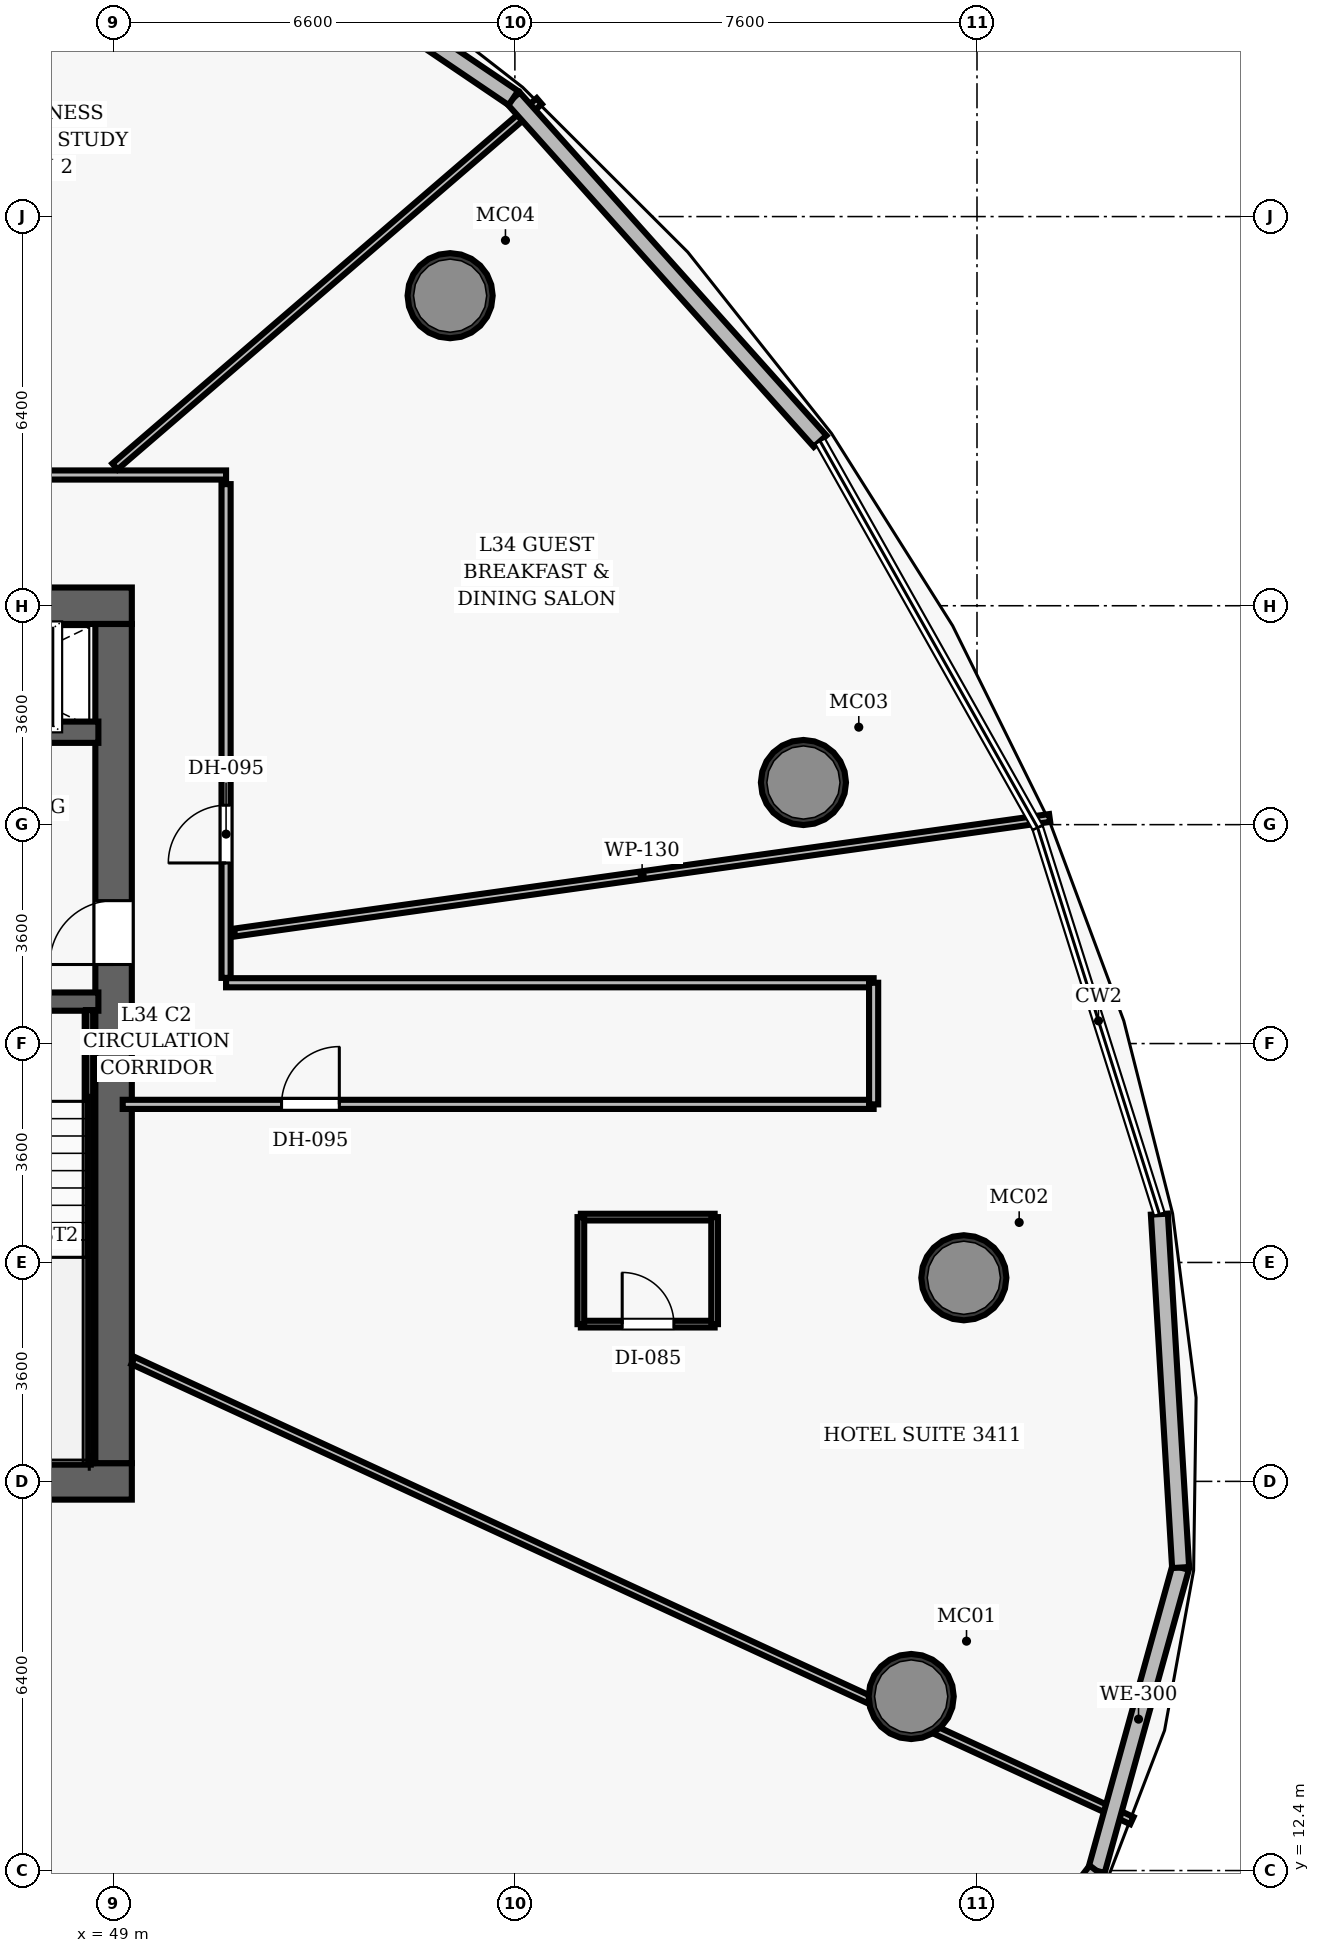
"""IFC4 building model, lengths in metres.
Left out: names, types, materials, properties, quantities, classifications, styles, units other than length and angle.
Written with IfcOpenShell. Run it as: python <this file> out.ifc"""

import sys

from ifc_helpers import new_model, si_unit, direction, frame, frame_2d, origin, origin_2d, place, context, subcontext, project, spatial, rectangle, hollow_circle, extrude, element, fill, save


model = new_model("IFC4")
c1 = context("Model", 3, precision=1e-05, world=origin(), true_north=direction((0.0, 1.0)))
c2 = subcontext(c1, "Body", "Model", "MODEL_VIEW")
j1 = project(units=[si_unit("LENGTHUNIT", "METRE"), si_unit("PLANEANGLEUNIT", "RADIAN")], contexts=[c1])
p1 = place(None, origin())
s1 = spatial("IfcSite", under=j1, at=p1, CompositionType="ELEMENT")
p2 = place(p1, origin())
s2 = spatial("IfcBuilding", under=s1, at=p2, CompositionType="ELEMENT")
p3 = place(p2, frame((0.0, 0.0, 137.8)))
s3 = spatial("IfcBuildingStorey", under=s2, at=p3, CompositionType="ELEMENT", Elevation=137.8)
p4 = place(p3, frame((26.7, 18.8, 0.0), z_axis=(0.0, 0.0, 1.0), x_axis=(1.0, 0.0, 0.0)))
e1 = element("IfcWall", 1, at=p4, inside=s3, PredefinedType="SHEAR", context=c2, shape_type="SweptSolid", body=[
    extrude(rectangle(XDim=22.6, YDim=0.6, at=frame_2d((11.3, 0.0))), origin(), (0.0, 0.0, 1.0), 3.5),
])
p5 = place(p4, frame((14.52, 0.0, 0.0)))
e2 = element("IfcOpeningElement", 2, at=p5, cuts=e1, PredefinedType="OPENING", context=c2, shape_type="SweptSolid", body=[
    extrude(rectangle(XDim=1.05, YDim=2.15, at=frame_2d((0.525, 1.075))), frame((0.0, 0.31, 0.0), z_axis=(0.0, -1.0, 0.0), x_axis=(1.0, 0.0, 0.0)), (0.0, 0.0, 1.0), 0.62),
])
p6 = place(p3, frame((26.7, 33.2, 0.0), z_axis=(0.0, 0.0, 1.0), x_axis=(1.0, 0.0, 0.0)))
e3 = element("IfcWall", 3, at=p6, inside=s3, PredefinedType="SHEAR", context=c2, shape_type="SweptSolid", body=[
    extrude(rectangle(XDim=22.6, YDim=0.6, at=frame_2d((11.3, 0.0))), origin(), (0.0, 0.0, 1.0), 3.5),
])
p7 = place(p6, frame((4.62, 0.0, 0.0)))
e4 = element("IfcOpeningElement", 4, at=p7, cuts=e3, PredefinedType="OPENING", context=c2, shape_type="SweptSolid", body=[
    extrude(rectangle(XDim=1.05, YDim=2.15, at=frame_2d((0.525, 1.075))), frame((0.0, 0.31, 0.0), z_axis=(0.0, -1.0, 0.0), x_axis=(1.0, 0.0, 0.0)), (0.0, 0.0, 1.0), 0.62),
])
p8 = place(p6, frame((14.52, 0.0, 0.0)))
e5 = element("IfcOpeningElement", 5, at=p8, cuts=e3, PredefinedType="OPENING", context=c2, shape_type="SweptSolid", body=[
    extrude(rectangle(XDim=1.05, YDim=2.15, at=frame_2d((0.525, 1.075))), frame((0.0, 0.31, 0.0), z_axis=(0.0, -1.0, 0.0), x_axis=(1.0, 0.0, 0.0)), (0.0, 0.0, 1.0), 0.62),
])
p9 = place(p3, frame((49.0, 19.1, 0.0), z_axis=(0.0, 0.0, 1.0), x_axis=(0.0, 1.0, 0.0)))
e6 = element("IfcWall", 6, at=p9, inside=s3, PredefinedType="SHEAR", context=c2, shape_type="SweptSolid", body=[
    extrude(rectangle(XDim=13.8, YDim=0.6, at=frame_2d((6.9, 0.0))), origin(), (0.0, 0.0, 1.0), 3.5),
])
p10 = place(p9, frame((8.2, 0.0, 0.0)))
e7 = element("IfcOpeningElement", 7, at=p10, cuts=e6, PredefinedType="OPENING", context=c2, shape_type="SweptSolid", body=[
    extrude(rectangle(XDim=1.05, YDim=2.15, at=frame_2d((0.525, 1.075))), frame((0.0, 0.31, 0.0), z_axis=(0.0, -1.0, 0.0), x_axis=(1.0, 0.0, 0.0)), (0.0, 0.0, 1.0), 0.62),
])
for number, where, z_axis, x_axis in (
    (8, (62.118, 15.262, 0.0), (0.0, 0.0, 1.0), (1.0, 0.0, 0.0)),
    (9, (62.984, 22.148, 0.0), (0.0, 0.0, 1.0), (1.0, 0.0, 0.0)),
    (10, (60.346, 30.293, 0.0), (0.0, 0.0, 1.0), (1.0, 0.0, 0.0)),
    (11, (54.535, 38.299, 0.0), (0.0, 0.0, 1.0), (1.0, 0.0, 0.0)),
):
    element("IfcColumn", number, at=place(p3, frame(where, z_axis=z_axis, x_axis=x_axis)), inside=s3, PredefinedType="COLUMN", context=c2, shape_type="SweptSolid", body=[
        extrude(hollow_circle(Radius=0.7, WallThickness=0.055, at=origin_2d()), origin(), (0.0, 0.0, 1.0), 3.5),
    ])
p11 = place(p3, frame((45.08, 26.69, 0.0), z_axis=(0.0, 0.0, 1.0), x_axis=(1.0, 0.0, 0.0)))
e12 = element("IfcWall", 12, at=p11, inside=s3, PredefinedType="SHEAR", context=c2, shape_type="SweptSolid", body=[
    extrude(rectangle(XDim=3.67, YDim=0.3, at=frame_2d((1.835, 0.0))), origin(), (0.0, 0.0, 1.0), 3.5),
])
p12 = place(p11, frame((1.05, 0.0, 0.0)))
e13 = element("IfcOpeningElement", 13, at=p12, cuts=e12, PredefinedType="OPENING", context=c2, shape_type="SweptSolid", body=[
    extrude(rectangle(XDim=1.1, YDim=2.15, at=frame_2d((0.55, 1.075))), frame((0.0, 0.16, 0.0), z_axis=(0.0, -1.0, 0.0), x_axis=(1.0, 0.0, 0.0)), (0.0, 0.0, 1.0), 0.32),
])
p13 = place(p3, frame((48.605, 19.1, 0.0), z_axis=(0.0, 0.0, 1.0), x_axis=(0.0, 1.0, 0.0)))
e14 = element("IfcWall", 14, at=p13, inside=s3, PredefinedType="SHEAR", context=c2, shape_type="SweptSolid", body=[
    extrude(rectangle(XDim=7.45, YDim=0.12, at=frame_2d((3.725, 0.0))), origin(), (0.0, 0.0, 1.0), 3.5),
])
p14 = place(p3, frame((45.51, 19.16, 0.0), z_axis=(0.0, 0.0, 1.0), x_axis=(1.0, 0.0, 0.0)))
e15 = element("IfcWall", 15, at=p14, inside=s3, PredefinedType="SHEAR", context=c2, shape_type="SweptSolid", body=[
    extrude(rectangle(XDim=3.095, YDim=0.12, at=frame_2d((1.547, 0.0))), origin(), (0.0, 0.0, 1.0), 3.5),
])
p15 = place(p3, frame((45.08, 31.12, 0.0), z_axis=(0.0, 0.0, 1.0), x_axis=(1.0, 0.0, 0.0)))
e16 = element("IfcWall", 16, at=p15, inside=s3, PredefinedType="SHEAR", context=c2, shape_type="SweptSolid", body=[
    extrude(rectangle(XDim=3.67, YDim=0.35, at=frame_2d((1.835, 0.0))), origin(), (0.0, 0.0, 1.0), 2.675),
])
p16 = place(p15, frame((1.25, 0.0, 0.0)))
e17 = element("IfcOpeningElement", 17, at=p16, cuts=e16, PredefinedType="OPENING", context=c2, shape_type="SweptSolid", body=[
    extrude(rectangle(XDim=1.1, YDim=2.15, at=frame_2d((0.55, 1.075))), frame((0.0, 0.185, 0.0), z_axis=(0.0, -1.0, 0.0), x_axis=(1.0, 0.0, 0.0)), (0.0, 0.0, 1.0), 0.37),
])
p17 = place(p3, frame((24.85, 35.35, 0.0), z_axis=(0.0, 0.0, 1.0), x_axis=(1.0, 0.0, 0.0)))
e18 = element("IfcWall", 18, at=p17, inside=s3, PredefinedType="PARTITIONING", context=c2, shape_type="SweptSolid", body=[
    extrude(rectangle(XDim=26.0, YDim=0.15, at=frame_2d((13.0, 0.0))), origin(), (0.0, 0.0, 1.0), 2.675),
])
p18 = place(p17, frame((17.4, 0.0, 0.0)))
e19 = element("IfcOpeningElement", 19, at=p18, cuts=e18, PredefinedType="OPENING", context=c2, shape_type="SweptSolid", body=[
    extrude(rectangle(XDim=0.95, YDim=2.15, at=frame_2d((0.475, 1.075))), frame((0.0, 0.085, 0.0), z_axis=(0.0, -1.0, 0.0), x_axis=(1.0, 0.0, 0.0)), (0.0, 0.0, 1.0), 0.17),
])
p19 = place(p17, frame((12.708, 0.0, 0.0)))
e20 = element("IfcOpeningElement", 20, at=p19, cuts=e18, PredefinedType="OPENING", context=c2, shape_type="SweptSolid", body=[
    extrude(rectangle(XDim=0.95, YDim=2.15, at=frame_2d((0.475, 1.075))), frame((0.0, 0.085, 0.0), z_axis=(0.0, -1.0, 0.0), x_axis=(1.0, 0.0, 0.0)), (0.0, 0.0, 1.0), 0.17),
])
p20 = place(p17, frame((7.158, 0.0, 0.0)))
e21 = element("IfcOpeningElement", 21, at=p20, cuts=e18, PredefinedType="OPENING", context=c2, shape_type="SweptSolid", body=[
    extrude(rectangle(XDim=0.95, YDim=2.15, at=frame_2d((0.475, 1.075))), frame((0.0, 0.085, 0.0), z_axis=(0.0, -1.0, 0.0), x_axis=(1.0, 0.0, 0.0)), (0.0, 0.0, 1.0), 0.17),
])
p21 = place(p3, frame((50.85, 27.08, 0.0), z_axis=(0.0, 0.0, 1.0), x_axis=(0.0, 1.0, 0.0)))
e22 = element("IfcWall", 22, at=p21, inside=s3, PredefinedType="PARTITIONING", context=c2, shape_type="SweptSolid", body=[
    extrude(rectangle(XDim=8.12, YDim=0.15, at=frame_2d((4.06, 0.0))), origin(), (0.0, 0.0, 1.0), 2.675),
])
p22 = place(p21, frame((1.89, 0.0, 0.0)))
e23 = element("IfcOpeningElement", 23, at=p22, cuts=e22, PredefinedType="OPENING", context=c2, shape_type="SweptSolid", body=[
    extrude(rectangle(XDim=0.95, YDim=2.15, at=frame_2d((0.475, 1.075))), frame((0.0, 0.085, 0.0), z_axis=(0.0, -1.0, 0.0), x_axis=(1.0, 0.0, 0.0)), (0.0, 0.0, 1.0), 0.17),
])
p23 = place(p3, frame((50.85, 27.0, 0.0), z_axis=(0.0, 0.0, 1.0), x_axis=(1.0, 0.0, 0.0)))
e24 = element("IfcWall", 24, at=p23, inside=s3, PredefinedType="PARTITIONING", context=c2, shape_type="SweptSolid", body=[
    extrude(rectangle(XDim=10.65, YDim=0.15, at=frame_2d((5.325, 0.0))), origin(), (0.0, 0.0, 1.0), 2.675),
])
p24 = place(p3, frame((49.15, 25.0, 0.0), z_axis=(0.0, 0.0, 1.0), x_axis=(1.0, 0.0, 0.0)))
e25 = element("IfcWall", 25, at=p24, inside=s3, PredefinedType="PARTITIONING", context=c2, shape_type="SweptSolid", body=[
    extrude(rectangle(XDim=12.35, YDim=0.15, at=frame_2d((6.175, 0.0))), origin(), (0.0, 0.0, 1.0), 2.675),
])
p25 = place(p24, frame((2.613, 0.0, 0.0)))
e26 = element("IfcOpeningElement", 26, at=p25, cuts=e25, PredefinedType="OPENING", context=c2, shape_type="SweptSolid", body=[
    extrude(rectangle(XDim=0.95, YDim=2.15, at=frame_2d((0.475, 1.075))), frame((0.0, 0.085, 0.0), z_axis=(0.0, -1.0, 0.0), x_axis=(1.0, 0.0, 0.0)), (0.0, 0.0, 1.0), 0.17),
])
p26 = place(p3, frame((61.5, 25.0, 0.0), z_axis=(0.0, 0.0, 1.0), x_axis=(0.0, 1.0, 0.0)))
e27 = element("IfcWall", 27, at=p26, inside=s3, PredefinedType="PARTITIONING", context=c2, shape_type="SweptSolid", body=[
    extrude(rectangle(XDim=2.0, YDim=0.15, at=frame_2d((1.0, 0.0))), origin(), (0.0, 0.0, 1.0), 2.675),
])
p27 = place(p3, frame((50.99, 27.826, 0.0), z_axis=(0.0, 0.0, 1.0), x_axis=(0.990267262421, 0.13917883811, 0.0)))
e28 = element("IfcWall", 28, at=p27, inside=s3, PredefinedType="PARTITIONING", context=c2, shape_type="SweptSolid", body=[
    extrude(rectangle(XDim=13.537, YDim=0.13, at=frame_2d((6.769, 0.0))), origin(), (0.0, 0.0, 1.0), 2.675),
])
p28 = place(p3, frame((49.022, 35.49, 0.0), z_axis=(0.0, 0.0, 1.0), x_axis=(0.757832522769, 0.65244913015, 0.0)))
e29 = element("IfcWall", 29, at=p28, inside=s3, PredefinedType="PARTITIONING", context=c2, shape_type="SweptSolid", body=[
    extrude(rectangle(XDim=9.209, YDim=0.13, at=frame_2d((4.604, 0.0))), origin(), (0.0, 0.0, 1.0), 2.675),
])
p29 = place(p3, frame((42.799, 18.48, 0.0), z_axis=(0.0, 0.0, 1.0), x_axis=(0.537969305378, -0.842964427762, 0.0)))
e30 = element("IfcWall", 30, at=p29, inside=s3, PredefinedType="PARTITIONING", context=c2, shape_type="SweptSolid", body=[
    extrude(rectangle(XDim=18.19, YDim=0.13, at=frame_2d((9.095, 0.0))), origin(), (0.0, 0.0, 1.0), 2.675),
])
p30 = place(p3, frame((49.32, 20.787, 0.0), z_axis=(0.0, 0.0, 1.0), x_axis=(0.90831109322, -0.418295299918, 0.0)))
e31 = element("IfcWall", 31, at=p30, inside=s3, PredefinedType="PARTITIONING", context=c2, shape_type="SweptSolid", body=[
    extrude(rectangle(XDim=18.086, YDim=0.13, at=frame_2d((9.043, 0.0))), origin(), (0.0, 0.0, 1.0), 2.675),
])
p31 = place(p3, frame((56.685, 21.386, 0.0), z_axis=(0.0, 0.0, 1.0), x_axis=(1.0, 0.0, 0.0)))
e32 = element("IfcWall", 32, at=p31, inside=s3, PredefinedType="PARTITIONING", context=c2, shape_type="SweptSolid", body=[
    extrude(rectangle(XDim=2.2, YDim=0.11, at=frame_2d((1.1, 0.0))), origin(), (0.0, 0.0, 1.0), 2.675),
])
p32 = place(p31, frame((0.68, 0.0, 0.0)))
e33 = element("IfcOpeningElement", 33, at=p32, cuts=e32, PredefinedType="OPENING", context=c2, shape_type="SweptSolid", body=[
    extrude(rectangle(XDim=0.85, YDim=2.1, at=frame_2d((0.425, 1.05))), frame((0.0, 0.065, 0.0), z_axis=(0.0, -1.0, 0.0), x_axis=(1.0, 0.0, 0.0)), (0.0, 0.0, 1.0), 0.13),
])
p33 = place(p3, frame((56.685, 23.146, 0.0), z_axis=(0.0, 0.0, 1.0), x_axis=(1.0, 0.0, 0.0)))
e34 = element("IfcWall", 34, at=p33, inside=s3, PredefinedType="PARTITIONING", context=c2, shape_type="SweptSolid", body=[
    extrude(rectangle(XDim=2.2, YDim=0.11, at=frame_2d((1.1, 0.0))), origin(), (0.0, 0.0, 1.0), 2.675),
])
for number, where, z_axis, x_axis in (
    (35, (56.685, 21.386, 0.0), (0.0, 0.0, 1.0), (0.0, 1.0, 0.0)),
    (36, (58.885, 21.386, 0.0), (0.0, 0.0, 1.0), (0.0, 1.0, 0.0)),
):
    element("IfcWall", number, at=place(p3, frame(where, z_axis=z_axis, x_axis=x_axis)), inside=s3, PredefinedType="PARTITIONING", context=c2, shape_type="SweptSolid", body=[
        extrude(rectangle(XDim=1.76, YDim=0.11, at=frame_2d((0.88, 0.0))), origin(), (0.0, 0.0, 1.0), 2.675),
    ])
p34 = place(p3, frame((66.549, 17.383, 0.0), z_axis=(0.0, 0.0, 1.0), x_axis=(-0.267621962154, -0.963523993149, 0.0)))
e37 = element("IfcWall", 37, at=p34, inside=s3, PredefinedType="SOLIDWALL", context=c2, shape_type="SweptSolid", body=[
    extrude(rectangle(XDim=5.174, YDim=0.28, at=frame_2d((2.587, 0.0))), origin(), (0.0, 0.0, 1.0), 3.26),
])
p35 = place(p3, frame((66.199, 23.195, 0.0), z_axis=(0.0, 0.0, 1.0), x_axis=(0.060044369296, -0.998195709125, 0.0)))
e38 = element("IfcWall", 38, at=p35, inside=s3, PredefinedType="SOLIDWALL", context=c2, shape_type="SweptSolid", body=[
    extrude(rectangle(XDim=5.823, YDim=0.28, at=frame_2d((2.911, 0.0))), origin(), (0.0, 0.0, 1.0), 3.26),
])
p36 = place(p3, frame((55.575, 41.549, 0.0), z_axis=(0.0, 0.0, 1.0), x_axis=(0.666525173895, -0.745482523312, 0.0)))
e39 = element("IfcWall", 39, at=p36, inside=s3, PredefinedType="SOLIDWALL", context=c2, shape_type="SweptSolid", body=[
    extrude(rectangle(XDim=7.569, YDim=0.28, at=frame_2d((3.785, 0.0))), origin(), (0.0, 0.0, 1.0), 3.26),
])
p37 = place(p3, frame((49.267, 45.819, 0.0), z_axis=(0.0, 0.0, 1.0), x_axis=(0.828089557731, -0.560595829789, 0.0)))
e40 = element("IfcWall", 40, at=p37, inside=s3, PredefinedType="SOLIDWALL", context=c2, shape_type="SweptSolid", body=[
    extrude(rectangle(XDim=7.617, YDim=0.28, at=frame_2d((3.809, 0.0))), origin(), (0.0, 0.0, 1.0), 3.26),
])
p38 = place(p3, frame((65.164, 12.397, 0.0), z_axis=(0.0, 0.0, 1.0), x_axis=(-0.611196361644, -0.791479000045, 0.0)))
e41 = element("IfcWall", 41, at=p38, inside=s3, PredefinedType="SOLIDWALL", context=c2, shape_type="SweptSolid", body=[
    extrude(rectangle(XDim=5.174, YDim=0.28, at=frame_2d((2.587, 0.0))), origin(), (0.0, 0.0, 1.0), 3.26),
])
p39 = place(p10, origin())
e42 = element("IfcDoor", 42, at=p39, inside=s3, OperationType="SINGLE_SWING_LEFT", PredefinedType="DOOR", context=c2, shape_type="SweptSolid", body=[
    extrude(rectangle(XDim=1.05, YDim=2.15, at=frame_2d((0.525, 1.075))), frame((0.0, 0.025, 0.0), z_axis=(0.0, -1.0, 0.0), x_axis=(1.0, 0.0, 0.0)), (0.0, 0.0, 1.0), 0.05),
])
fill(e7, e42)
p40 = place(p22, origin())
e43 = element("IfcDoor", 43, at=p40, inside=s3, OperationType="SINGLE_SWING_LEFT", PredefinedType="DOOR", context=c2, shape_type="SweptSolid", body=[
    extrude(rectangle(XDim=0.95, YDim=2.15, at=frame_2d((0.475, 1.075))), frame((0.0, 0.025, 0.0), z_axis=(0.0, -1.0, 0.0), x_axis=(1.0, 0.0, 0.0)), (0.0, 0.0, 1.0), 0.05),
])
fill(e23, e43)
p41 = place(p25, origin())
e44 = element("IfcDoor", 44, at=p41, inside=s3, OperationType="SINGLE_SWING_RIGHT", PredefinedType="DOOR", context=c2, shape_type="SweptSolid", body=[
    extrude(rectangle(XDim=0.95, YDim=2.15, at=frame_2d((0.475, 1.075))), frame((0.0, 0.025, 0.0), z_axis=(0.0, -1.0, 0.0), x_axis=(1.0, 0.0, 0.0)), (0.0, 0.0, 1.0), 0.05),
])
fill(e26, e44)
p42 = place(p32, origin())
e45 = element("IfcDoor", 45, at=p42, inside=s3, OperationType="SINGLE_SWING_LEFT", PredefinedType="DOOR", context=c2, shape_type="SweptSolid", body=[
    extrude(rectangle(XDim=0.85, YDim=2.1, at=frame_2d((0.425, 1.05))), frame((0.0, 0.025, 0.0), z_axis=(0.0, -1.0, 0.0), x_axis=(1.0, 0.0, 0.0)), (0.0, 0.0, 1.0), 0.05),
])
fill(e33, e45)
save(model, sys.argv[1])
